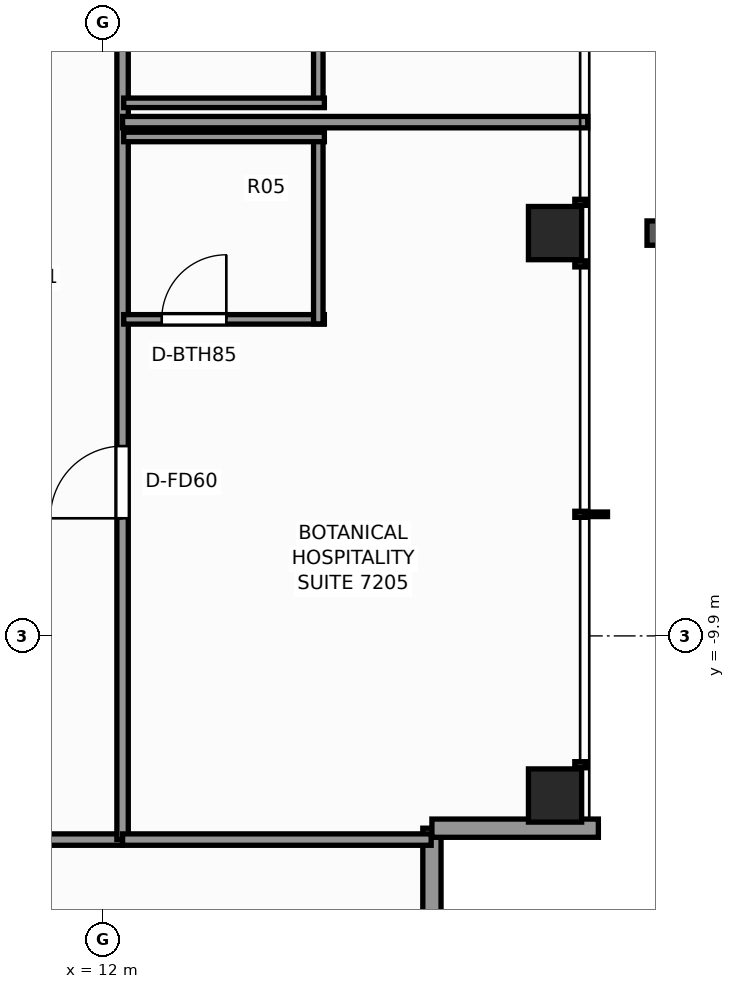
"""IFC4 building model, lengths in metres.
Left out: names, types, materials, properties, quantities, classifications, styles, units other than length and angle.
Written with IfcOpenShell. Run it as: python <this file> out.ifc"""

import sys

from ifc_helpers import new_model, si_unit, direction, frame, frame_2d, origin, origin_2d, place, context, subcontext, project, spatial, rectangle, extrude, element, fill, save


model = new_model("IFC4")
c1 = context("Model", 3, precision=1e-05, world=origin(), true_north=direction((0.0, 1.0)))
c2 = subcontext(c1, "Body", "Model", "MODEL_VIEW")
j1 = project(units=[si_unit("LENGTHUNIT", "METRE"), si_unit("PLANEANGLEUNIT", "RADIAN")], contexts=[c1])
p1 = place(None, origin())
s1 = spatial("IfcSite", under=j1, at=p1, CompositionType="ELEMENT")
p2 = place(p1, origin())
s2 = spatial("IfcBuilding", under=s1, at=p2, CompositionType="ELEMENT")
p3 = place(p2, frame((0.0, 0.0, 247.9)))
s3 = spatial("IfcBuildingStorey", under=s2, at=p3, CompositionType="ELEMENT", Elevation=247.9)
for number, where, z_axis, x_axis in (
    (1, (17.95, -12.0, 0.0), (0.0, 0.0, 1.0), (1.0, 0.0, 0.0)),
    (2, (17.95, -4.6, 0.0), (0.0, 0.0, 1.0), (1.0, 0.0, 0.0)),
):
    element("IfcColumn", number, at=place(p3, frame(where, z_axis=z_axis, x_axis=x_axis)), inside=s3, PredefinedType="COLUMN", context=c2, shape_type="SweptSolid", body=[
        extrude(rectangle(XDim=0.7, YDim=0.7, at=origin_2d()), origin(), (0.0, 0.0, 1.0), 3.5),
    ])
p4 = place(p3, frame((16.33, -12.43, 0.0), z_axis=(0.0, 0.0, 1.0), x_axis=(0.0, -1.0, 0.0)))
e3 = element("IfcWall", 3, at=p4, inside=s3, PredefinedType="STANDARD", context=c2, shape_type="SweptSolid", body=[
    extrude(rectangle(XDim=2.19, YDim=0.24, at=frame_2d((1.095, 0.0))), origin(), (0.0, 0.0, 1.0), 2.633),
])
p5 = place(p3, frame((18.52, -12.43, 0.0), z_axis=(0.0, 0.0, 1.0), x_axis=(-1.0, 0.0, 0.0)))
e4 = element("IfcWall", 4, at=p5, inside=s3, PredefinedType="STANDARD", context=c2, shape_type="SweptSolid", body=[
    extrude(rectangle(XDim=2.19, YDim=0.24, at=frame_2d((1.095, 0.0))), origin(), (0.0, 0.0, 1.0), 2.633),
])
p6 = place(p3, frame((-12.58, -12.58, 0.0), z_axis=(0.0, 0.0, 1.0), x_axis=(1.0, 0.0, 0.0)))
e5 = element("IfcWall", 5, at=p6, inside=s3, PredefinedType="PARTITIONING", context=c2, shape_type="SweptSolid", body=[
    extrude(rectangle(XDim=24.84, YDim=0.15, at=frame_2d((12.42, 0.0))), origin(), (0.0, 0.0, 1.0), 2.539),
])
p7 = place(p6, frame((3.363, 0.0, 0.0)))
e6 = element("IfcOpeningElement", 6, at=p7, cuts=e5, PredefinedType="OPENING", context=c2, shape_type="SweptSolid", body=[
    extrude(rectangle(XDim=0.9, YDim=2.06, at=frame_2d((0.45, 1.03))), frame((0.0, 0.085, 0.0), z_axis=(0.0, -1.0, 0.0), x_axis=(1.0, 0.0, 0.0)), (0.0, 0.0, 1.0), 0.17),
])
p8 = place(p6, frame((5.698, 0.0, 0.0)))
e7 = element("IfcOpeningElement", 7, at=p8, cuts=e5, PredefinedType="OPENING", context=c2, shape_type="SweptSolid", body=[
    extrude(rectangle(XDim=0.9, YDim=2.06, at=frame_2d((0.45, 1.03))), frame((0.0, 0.085, 0.0), z_axis=(0.0, -1.0, 0.0), x_axis=(1.0, 0.0, 0.0)), (0.0, 0.0, 1.0), 0.17),
])
p9 = place(p6, frame((9.266, 0.0, 0.0)))
e8 = element("IfcOpeningElement", 8, at=p9, cuts=e5, PredefinedType="OPENING", context=c2, shape_type="SweptSolid", body=[
    extrude(rectangle(XDim=0.9, YDim=2.06, at=frame_2d((0.45, 1.03))), frame((0.0, 0.085, 0.0), z_axis=(0.0, -1.0, 0.0), x_axis=(1.0, 0.0, 0.0)), (0.0, 0.0, 1.0), 0.17),
])
p10 = place(p6, frame((13.388, 0.0, 0.0)))
e9 = element("IfcOpeningElement", 9, at=p10, cuts=e5, PredefinedType="OPENING", context=c2, shape_type="SweptSolid", body=[
    extrude(rectangle(XDim=0.95, YDim=2.06, at=frame_2d((0.475, 1.03))), frame((0.0, 0.085, 0.0), z_axis=(0.0, -1.0, 0.0), x_axis=(1.0, 0.0, 0.0)), (0.0, 0.0, 1.0), 0.17),
])
p11 = place(p6, frame((18.661, 0.0, 0.0)))
e10 = element("IfcOpeningElement", 10, at=p11, cuts=e5, PredefinedType="OPENING", context=c2, shape_type="SweptSolid", body=[
    extrude(rectangle(XDim=0.9, YDim=2.06, at=frame_2d((0.45, 1.03))), frame((0.0, 0.085, 0.0), z_axis=(0.0, -1.0, 0.0), x_axis=(1.0, 0.0, 0.0)), (0.0, 0.0, 1.0), 0.17),
])
p12 = place(p6, frame((20.996, 0.0, 0.0)))
e11 = element("IfcOpeningElement", 11, at=p12, cuts=e5, PredefinedType="OPENING", context=c2, shape_type="SweptSolid", body=[
    extrude(rectangle(XDim=0.9, YDim=2.06, at=frame_2d((0.45, 1.03))), frame((0.0, 0.085, 0.0), z_axis=(0.0, -1.0, 0.0), x_axis=(1.0, 0.0, 0.0)), (0.0, 0.0, 1.0), 0.17),
])
p13 = place(p3, frame((12.26, -12.58, 0.0), z_axis=(0.0, 0.0, 1.0), x_axis=(0.0, 1.0, 0.0)))
e12 = element("IfcWall", 12, at=p13, inside=s3, PredefinedType="PARTITIONING", context=c2, shape_type="SweptSolid", body=[
    extrude(rectangle(XDim=24.84, YDim=0.15, at=frame_2d((12.42, 0.0))), origin(), (0.0, 0.0, 1.0), 2.539),
])
p14 = place(p13, frame((4.228, 0.0, 0.0)))
e13 = element("IfcOpeningElement", 13, at=p14, cuts=e12, PredefinedType="OPENING", context=c2, shape_type="SweptSolid", body=[
    extrude(rectangle(XDim=0.95, YDim=2.06, at=frame_2d((0.475, 1.03))), frame((0.0, 0.085, 0.0), z_axis=(0.0, -1.0, 0.0), x_axis=(1.0, 0.0, 0.0)), (0.0, 0.0, 1.0), 0.17),
])
p15 = place(p13, frame((14.135, 0.0, 0.0)))
e14 = element("IfcOpeningElement", 14, at=p15, cuts=e12, PredefinedType="OPENING", context=c2, shape_type="SweptSolid", body=[
    extrude(rectangle(XDim=0.95, YDim=2.06, at=frame_2d((0.475, 1.03))), frame((0.0, 0.085, 0.0), z_axis=(0.0, -1.0, 0.0), x_axis=(1.0, 0.0, 0.0)), (0.0, 0.0, 1.0), 0.17),
])
p16 = place(p13, frame((20.542, 0.0, 0.0)))
e15 = element("IfcOpeningElement", 15, at=p16, cuts=e12, PredefinedType="OPENING", context=c2, shape_type="SweptSolid", body=[
    extrude(rectangle(XDim=0.95, YDim=2.06, at=frame_2d((0.475, 1.03))), frame((0.0, 0.085, 0.0), z_axis=(0.0, -1.0, 0.0), x_axis=(1.0, 0.0, 0.0)), (0.0, 0.0, 1.0), 0.17),
])
p17 = place(p3, frame((12.26, -12.58, 0.0), z_axis=(0.0, 0.0, 1.0), x_axis=(1.0, 0.0, 0.0)))
e16 = element("IfcWall", 16, at=p17, inside=s3, PredefinedType="PARTITIONING", context=c2, shape_type="SweptSolid", body=[
    extrude(rectangle(XDim=4.06, YDim=0.15, at=frame_2d((2.03, 0.0))), origin(), (0.0, 0.0, 1.0), 3.25),
])
p18 = place(p3, frame((12.26, -3.14, 0.0), z_axis=(0.0, 0.0, 1.0), x_axis=(1.0, 0.0, 0.0)))
e17 = element("IfcWall", 17, at=p18, inside=s3, PredefinedType="PARTITIONING", context=c2, shape_type="SweptSolid", body=[
    extrude(rectangle(XDim=6.12, YDim=0.15, at=frame_2d((3.06, 0.0))), origin(), (0.0, 0.0, 1.0), 2.539),
])
p19 = place(p3, frame((12.275, -5.735, 0.0), z_axis=(0.0, 0.0, 1.0), x_axis=(1.0, 0.0, 0.0)))
e18 = element("IfcWall", 18, at=p19, inside=s3, PredefinedType="PARTITIONING", context=c2, shape_type="SweptSolid", body=[
    extrude(rectangle(XDim=2.64, YDim=0.125, at=frame_2d((1.32, 0.0))), origin(), (0.0, 0.0, 1.0), 3.25),
])
p20 = place(p19, frame((0.5, 0.0, 0.0)))
e19 = element("IfcOpeningElement", 19, at=p20, cuts=e18, PredefinedType="OPENING", context=c2, shape_type="SweptSolid", body=[
    extrude(rectangle(XDim=0.85, YDim=2.03, at=frame_2d((0.425, 1.015))), frame((0.0, 0.073, 0.0), z_axis=(0.0, -1.0, 0.0), x_axis=(1.0, 0.0, 0.0)), (0.0, 0.0, 1.0), 0.145),
])
p21 = place(p3, frame((14.835, -5.795, 0.0), z_axis=(0.0, 0.0, 1.0), x_axis=(0.0, 1.0, 0.0)))
e20 = element("IfcWall", 20, at=p21, inside=s3, PredefinedType="PARTITIONING", context=c2, shape_type="SweptSolid", body=[
    extrude(rectangle(XDim=2.52, YDim=0.125, at=frame_2d((1.26, 0.0))), origin(), (0.0, 0.0, 1.0), 2.539),
])
p22 = place(p3, frame((12.275, -3.335, 0.0), z_axis=(0.0, 0.0, 1.0), x_axis=(1.0, 0.0, 0.0)))
e21 = element("IfcWall", 21, at=p22, inside=s3, PredefinedType="PARTITIONING", context=c2, shape_type="SweptSolid", body=[
    extrude(rectangle(XDim=2.64, YDim=0.125, at=frame_2d((1.32, 0.0))), origin(), (0.0, 0.0, 1.0), 2.539),
])
p23 = place(p3, frame((14.835, -2.946, 0.0), z_axis=(0.0, 0.0, 1.0), x_axis=(0.0, 1.0, 0.0)))
e22 = element("IfcWall", 22, at=p23, inside=s3, PredefinedType="PARTITIONING", context=c2, shape_type="SweptSolid", body=[
    extrude(rectangle(XDim=2.52, YDim=0.125, at=frame_2d((1.26, 0.0))), origin(), (0.0, 0.0, 1.0), 2.539),
])
p24 = place(p3, frame((12.275, -2.886, 0.0), z_axis=(0.0, 0.0, 1.0), x_axis=(1.0, 0.0, 0.0)))
e23 = element("IfcWall", 23, at=p24, inside=s3, PredefinedType="PARTITIONING", context=c2, shape_type="SweptSolid", body=[
    extrude(rectangle(XDim=2.64, YDim=0.125, at=frame_2d((1.32, 0.0))), origin(), (0.0, 0.0, 1.0), 2.539),
])
p25 = place(p20, origin())
e24 = element("IfcDoor", 24, at=p25, inside=s3, OperationType="SINGLE_SWING_RIGHT", PredefinedType="DOOR", context=c2, shape_type="SweptSolid", body=[
    extrude(rectangle(XDim=0.85, YDim=2.03, at=frame_2d((0.425, 1.015))), frame((0.0, 0.025, 0.0), z_axis=(0.0, -1.0, 0.0), x_axis=(1.0, 0.0, 0.0)), (0.0, 0.0, 1.0), 0.05),
])
fill(e19, e24)
p26 = place(p14, origin())
e25 = element("IfcDoor", 25, at=p26, inside=s3, OperationType="SINGLE_SWING_LEFT", PredefinedType="DOOR", context=c2, shape_type="SweptSolid", body=[
    extrude(rectangle(XDim=0.95, YDim=2.06, at=frame_2d((0.475, 1.03))), frame((0.0, 0.025, 0.0), z_axis=(0.0, -1.0, 0.0), x_axis=(1.0, 0.0, 0.0)), (0.0, 0.0, 1.0), 0.05),
])
fill(e13, e25)
save(model, sys.argv[1])
